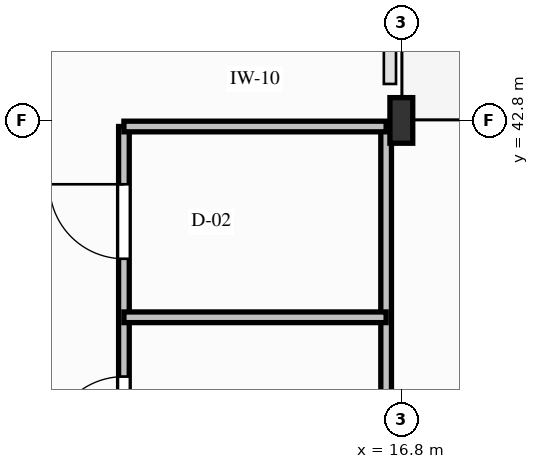
"""IFC4 building model, lengths in metres.
Left out: names, types, materials, properties, quantities, classifications, styles, units other than length and angle.
Written with IfcOpenShell. Run it as: python <this file> out.ifc"""

import sys

from ifc_helpers import new_model, si_unit, direction, frame, frame_2d, origin, origin_2d, place, context, subcontext, project, spatial, rectangle, i_section, extrude, element, fill, save


model = new_model("IFC4")
c1 = context("Model", 3, precision=1e-05, world=origin(), true_north=direction((0.0, 1.0)))
c2 = subcontext(c1, "Body", "Model", "MODEL_VIEW")
j1 = project(units=[si_unit("LENGTHUNIT", "METRE"), si_unit("PLANEANGLEUNIT", "RADIAN")], contexts=[c1])
p1 = place(None, origin())
s1 = spatial("IfcSite", under=j1, at=p1, CompositionType="ELEMENT")
p2 = place(p1, origin())
s2 = spatial("IfcBuilding", under=s1, at=p2, CompositionType="ELEMENT")
p3 = place(p2, origin())
s3 = spatial("IfcBuildingStorey", under=s2, at=p3, CompositionType="ELEMENT", Elevation=0.0)
p4 = place(p3, frame((16.8, 42.8, 0.0), z_axis=(0.0, 0.0, 1.0), x_axis=(1.0, 0.0, 0.0)))
e1 = element("IfcColumn", 1, at=p4, inside=s3, PredefinedType="COLUMN", context=c2, shape_type="SweptSolid", body=[
    extrude(i_section(OverallWidth=0.3, OverallDepth=0.6, WebThickness=0.015, FlangeThickness=0.03, FilletRadius=0.027, at=origin_2d()), origin(), (0.0, 0.0, 1.0), 4.5),
])
p5 = place(p3, frame((13.15, 34.9, 0.0), z_axis=(0.0, 0.0, 1.0), x_axis=(0.0, 1.0, 0.0)))
e2 = element("IfcWall", 2, at=p5, inside=s3, PredefinedType="PARTITIONING", context=c2, shape_type="SweptSolid", body=[
    extrude(rectangle(XDim=7.82, YDim=0.14, at=frame_2d((3.91, 0.0))), origin(), (0.0, 0.0, 1.0), 3.928),
])
p6 = place(p5, frame((0.9, 0.0, 0.0)))
e3 = element("IfcOpeningElement", 3, at=p6, cuts=e2, PredefinedType="OPENING", context=c2, shape_type="SweptSolid", body=[
    extrude(rectangle(XDim=0.95, YDim=2.12, at=frame_2d((0.475, 1.06))), frame((0.0, 0.08, 0.0), z_axis=(0.0, -1.0, 0.0), x_axis=(1.0, 0.0, 0.0)), (0.0, 0.0, 1.0), 0.16),
])
p7 = place(p5, frame((3.55, 0.0, 0.0)))
e4 = element("IfcOpeningElement", 4, at=p7, cuts=e2, PredefinedType="OPENING", context=c2, shape_type="SweptSolid", body=[
    extrude(rectangle(XDim=0.98, YDim=2.14, at=frame_2d((0.49, 1.07))), frame((0.0, 0.08, 0.0), z_axis=(0.0, -1.0, 0.0), x_axis=(1.0, 0.0, 0.0)), (0.0, 0.0, 1.0), 0.16),
])
p8 = place(p5, frame((6.08, 0.0, 0.0)))
e5 = element("IfcOpeningElement", 5, at=p8, cuts=e2, PredefinedType="OPENING", context=c2, shape_type="SweptSolid", body=[
    extrude(rectangle(XDim=0.98, YDim=2.14, at=frame_2d((0.49, 1.07))), frame((0.0, 0.08, 0.0), z_axis=(0.0, -1.0, 0.0), x_axis=(1.0, 0.0, 0.0)), (0.0, 0.0, 1.0), 0.16),
])
p9 = place(p3, frame((16.6, 34.9, 0.0), z_axis=(0.0, 0.0, 1.0), x_axis=(0.0, 1.0, 0.0)))
e6 = element("IfcWall", 6, at=p9, inside=s3, PredefinedType="PARTITIONING", context=c2, shape_type="SweptSolid", body=[
    extrude(rectangle(XDim=7.82, YDim=0.14, at=frame_2d((3.91, 0.0))), origin(), (0.0, 0.0, 1.0), 3.728),
])
p10 = place(p3, frame((13.15, 42.72, 0.0), z_axis=(0.0, 0.0, 1.0), x_axis=(1.0, 0.0, 0.0)))
e7 = element("IfcWall", 7, at=p10, inside=s3, PredefinedType="PARTITIONING", context=c2, shape_type="SweptSolid", body=[
    extrude(rectangle(XDim=3.45, YDim=0.14, at=frame_2d((1.725, 0.0))), origin(), (0.0, 0.0, 1.0), 3.728),
])
p11 = place(p3, frame((13.15, 40.21, 0.0), z_axis=(0.0, 0.0, 1.0), x_axis=(1.0, 0.0, 0.0)))
e8 = element("IfcWall", 8, at=p11, inside=s3, PredefinedType="PARTITIONING", context=c2, shape_type="SweptSolid", body=[
    extrude(rectangle(XDim=3.45, YDim=0.14, at=frame_2d((1.725, 0.0))), origin(), (0.0, 0.0, 1.0), 3.948),
])
p12 = place(p7, origin())
e9 = element("IfcDoor", 9, at=p12, inside=s3, OperationType="SINGLE_SWING_LEFT", PredefinedType="DOOR", context=c2, shape_type="SweptSolid", body=[
    extrude(rectangle(XDim=0.98, YDim=2.14, at=frame_2d((0.49, 1.07))), frame((0.0, 0.025, 0.0), z_axis=(0.0, -1.0, 0.0), x_axis=(1.0, 0.0, 0.0)), (0.0, 0.0, 1.0), 0.05),
])
fill(e4, e9)
p13 = place(p8, origin())
e10 = element("IfcDoor", 10, at=p13, inside=s3, OperationType="SINGLE_SWING_RIGHT", PredefinedType="DOOR", context=c2, shape_type="SweptSolid", body=[
    extrude(rectangle(XDim=0.98, YDim=2.14, at=frame_2d((0.49, 1.07))), frame((0.0, 0.025, 0.0), z_axis=(0.0, -1.0, 0.0), x_axis=(1.0, 0.0, 0.0)), (0.0, 0.0, 1.0), 0.05),
])
fill(e5, e10)
save(model, sys.argv[1])
